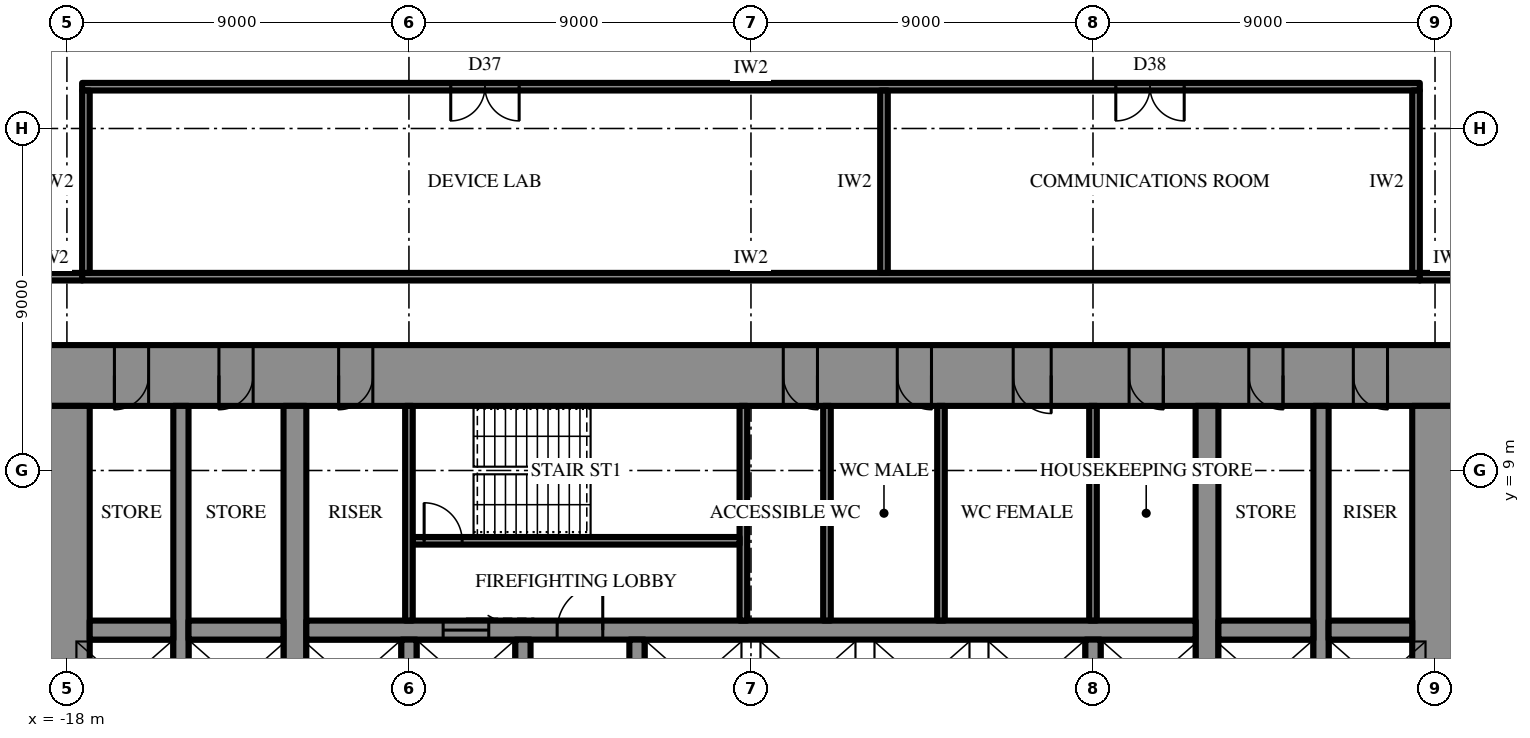
"""IFC4 building model, lengths in metres.
Left out: names, types, materials, properties, quantities, classifications, styles, units other than length and angle.
Written with IfcOpenShell. Run it as: python <this file> out.ifc"""

import sys

from ifc_helpers import new_model, si_unit, direction, frame, frame_2d, origin, place, context, subcontext, project, spatial, rectangle, extrude, element, fill, save


model = new_model("IFC4")
c1 = context("Model", 3, precision=1e-05, world=origin(), true_north=direction((0.0, 1.0)))
c2 = subcontext(c1, "Body", "Model", "MODEL_VIEW")
j1 = project(units=[si_unit("LENGTHUNIT", "METRE"), si_unit("PLANEANGLEUNIT", "RADIAN")], contexts=[c1])
p1 = place(None, origin())
s1 = spatial("IfcSite", under=j1, at=p1, CompositionType="ELEMENT")
p2 = place(p1, origin())
s2 = spatial("IfcBuilding", under=s1, at=p2, CompositionType="ELEMENT")
p3 = place(p2, frame((0.0, 0.0, 44.5)))
s3 = spatial("IfcBuildingStorey", under=s2, at=p3, CompositionType="ELEMENT", Elevation=44.5)
p4 = place(p3, frame((-18.6, 11.5, 0.0), z_axis=(0.0, 0.0, 1.0), x_axis=(1.0, 0.0, 0.0)))
e1 = element("IfcWall", 1, at=p4, inside=s3, PredefinedType="SHEAR", context=c2, shape_type="SweptSolid", body=[
    extrude(rectangle(XDim=37.2, YDim=1.6, at=frame_2d((18.6, 0.0))), origin(), (0.0, 0.0, 1.0), 4.2),
])
p5 = place(p4, frame((19.45, 0.0, 0.0)))
e2 = element("IfcOpeningElement", 2, at=p5, cuts=e1, PredefinedType="OPENING", context=c2, shape_type="SweptSolid", body=[
    extrude(rectangle(XDim=0.9, YDim=2.2, at=frame_2d((0.45, 1.1))), frame((0.0, 0.81, 0.0), z_axis=(0.0, -1.0, 0.0), x_axis=(1.0, 0.0, 0.0)), (0.0, 0.0, 1.0), 1.62),
])
p6 = place(p4, frame((22.45, 0.0, 0.0)))
e3 = element("IfcOpeningElement", 3, at=p6, cuts=e1, PredefinedType="OPENING", context=c2, shape_type="SweptSolid", body=[
    extrude(rectangle(XDim=0.9, YDim=2.2, at=frame_2d((0.45, 1.1))), frame((0.0, 0.81, 0.0), z_axis=(0.0, -1.0, 0.0), x_axis=(1.0, 0.0, 0.0)), (0.0, 0.0, 1.0), 1.62),
])
p7 = place(p4, frame((25.5, 0.0, 0.0)))
e4 = element("IfcOpeningElement", 4, at=p7, cuts=e1, PredefinedType="OPENING", context=c2, shape_type="SweptSolid", body=[
    extrude(rectangle(XDim=1.0, YDim=2.2, at=frame_2d((0.5, 1.1))), frame((0.0, 0.81, 0.0), z_axis=(0.0, -1.0, 0.0), x_axis=(1.0, 0.0, 0.0)), (0.0, 0.0, 1.0), 1.62),
])
p8 = place(p4, frame((1.85, 0.0, 0.0)))
e5 = element("IfcOpeningElement", 5, at=p8, cuts=e1, PredefinedType="OPENING", context=c2, shape_type="SweptSolid", body=[
    extrude(rectangle(XDim=0.9, YDim=2.2, at=frame_2d((0.45, 1.1))), frame((0.0, 0.81, 0.0), z_axis=(0.0, -1.0, 0.0), x_axis=(1.0, 0.0, 0.0)), (0.0, 0.0, 1.0), 1.62),
])
p9 = place(p4, frame((4.6, 0.0, 0.0)))
e6 = element("IfcOpeningElement", 6, at=p9, cuts=e1, PredefinedType="OPENING", context=c2, shape_type="SweptSolid", body=[
    extrude(rectangle(XDim=0.9, YDim=2.2, at=frame_2d((0.45, 1.1))), frame((0.0, 0.81, 0.0), z_axis=(0.0, -1.0, 0.0), x_axis=(1.0, 0.0, 0.0)), (0.0, 0.0, 1.0), 1.62),
])
p10 = place(p4, frame((7.75, 0.0, 0.0)))
e7 = element("IfcOpeningElement", 7, at=p10, cuts=e1, PredefinedType="OPENING", context=c2, shape_type="SweptSolid", body=[
    extrude(rectangle(XDim=0.9, YDim=2.2, at=frame_2d((0.45, 1.1))), frame((0.0, 0.81, 0.0), z_axis=(0.0, -1.0, 0.0), x_axis=(1.0, 0.0, 0.0)), (0.0, 0.0, 1.0), 1.62),
])
p11 = place(p4, frame((28.55, 0.0, 0.0)))
e8 = element("IfcOpeningElement", 8, at=p11, cuts=e1, PredefinedType="OPENING", context=c2, shape_type="SweptSolid", body=[
    extrude(rectangle(XDim=0.9, YDim=2.2, at=frame_2d((0.45, 1.1))), frame((0.0, 0.81, 0.0), z_axis=(0.0, -1.0, 0.0), x_axis=(1.0, 0.0, 0.0)), (0.0, 0.0, 1.0), 1.62),
])
p12 = place(p4, frame((31.7, 0.0, 0.0)))
e9 = element("IfcOpeningElement", 9, at=p12, cuts=e1, PredefinedType="OPENING", context=c2, shape_type="SweptSolid", body=[
    extrude(rectangle(XDim=0.9, YDim=2.2, at=frame_2d((0.45, 1.1))), frame((0.0, 0.81, 0.0), z_axis=(0.0, -1.0, 0.0), x_axis=(1.0, 0.0, 0.0)), (0.0, 0.0, 1.0), 1.62),
])
p13 = place(p4, frame((34.45, 0.0, 0.0)))
e10 = element("IfcOpeningElement", 10, at=p13, cuts=e1, PredefinedType="OPENING", context=c2, shape_type="SweptSolid", body=[
    extrude(rectangle(XDim=0.9, YDim=2.2, at=frame_2d((0.45, 1.1))), frame((0.0, 0.81, 0.0), z_axis=(0.0, -1.0, 0.0), x_axis=(1.0, 0.0, 0.0)), (0.0, 0.0, 1.0), 1.62),
])
p14 = place(p3, frame((18.0, -10.7, 0.0), z_axis=(0.0, 0.0, 1.0), x_axis=(0.0, 1.0, 0.0)))
e11 = element("IfcWall", 11, at=p14, inside=s3, PredefinedType="SHEAR", context=c2, shape_type="SweptSolid", body=[
    extrude(rectangle(XDim=21.4, YDim=1.2, at=frame_2d((10.7, 0.0))), origin(), (0.0, 0.0, 1.0), 4.2),
])
p15 = place(p14, frame((9.8, 0.0, 0.0)))
e12 = element("IfcOpeningElement", 12, at=p15, cuts=e11, PredefinedType="OPENING", context=c2, shape_type="SweptSolid", body=[
    extrude(rectangle(XDim=1.8, YDim=2.4, at=frame_2d((0.9, 1.2))), frame((0.0, 0.61, 0.0), z_axis=(0.0, -1.0, 0.0), x_axis=(1.0, 0.0, 0.0)), (0.0, 0.0, 1.0), 1.22),
])
p16 = place(p3, frame((-18.0, 10.7, 0.0), z_axis=(0.0, 0.0, 1.0), x_axis=(0.0, -1.0, 0.0)))
e13 = element("IfcWall", 13, at=p16, inside=s3, PredefinedType="SHEAR", context=c2, shape_type="SweptSolid", body=[
    extrude(rectangle(XDim=21.4, YDim=1.2, at=frame_2d((10.7, 0.0))), origin(), (0.0, 0.0, 1.0), 4.2),
])
p17 = place(p16, frame((9.8, 0.0, 0.0)))
e14 = element("IfcOpeningElement", 14, at=p17, cuts=e13, PredefinedType="OPENING", context=c2, shape_type="SweptSolid", body=[
    extrude(rectangle(XDim=1.8, YDim=2.4, at=frame_2d((0.9, 1.2))), frame((0.0, 0.61, 0.0), z_axis=(0.0, -1.0, 0.0), x_axis=(1.0, 0.0, 0.0)), (0.0, 0.0, 1.0), 1.22),
])
p18 = place(p3, frame((12.0, -10.7, 0.0), z_axis=(0.0, 0.0, 1.0), x_axis=(0.0, 1.0, 0.0)))
e15 = element("IfcWall", 15, at=p18, inside=s3, PredefinedType="SHEAR", context=c2, shape_type="SweptSolid", body=[
    extrude(rectangle(XDim=21.4, YDim=0.6, at=frame_2d((10.7, 0.0))), origin(), (0.0, 0.0, 1.0), 4.2),
])
p19 = place(p18, frame((9.8, 0.0, 0.0)))
e16 = element("IfcOpeningElement", 16, at=p19, cuts=e15, PredefinedType="OPENING", context=c2, shape_type="SweptSolid", body=[
    extrude(rectangle(XDim=1.8, YDim=2.4, at=frame_2d((0.9, 1.2))), frame((0.0, 0.31, 0.0), z_axis=(0.0, -1.0, 0.0), x_axis=(1.0, 0.0, 0.0)), (0.0, 0.0, 1.0), 0.62),
])
p20 = place(p3, frame((-12.0, -10.7, 0.0), z_axis=(0.0, 0.0, 1.0), x_axis=(0.0, 1.0, 0.0)))
e17 = element("IfcWall", 17, at=p20, inside=s3, PredefinedType="SHEAR", context=c2, shape_type="SweptSolid", body=[
    extrude(rectangle(XDim=21.4, YDim=0.6, at=frame_2d((10.7, 0.0))), origin(), (0.0, 0.0, 1.0), 4.2),
])
p21 = place(p20, frame((9.8, 0.0, 0.0)))
e18 = element("IfcOpeningElement", 18, at=p21, cuts=e17, PredefinedType="OPENING", context=c2, shape_type="SweptSolid", body=[
    extrude(rectangle(XDim=1.8, YDim=2.4, at=frame_2d((0.9, 1.2))), frame((0.0, 0.31, 0.0), z_axis=(0.0, -1.0, 0.0), x_axis=(1.0, 0.0, 0.0)), (0.0, 0.0, 1.0), 0.62),
])
p22 = place(p3, frame((15.0, -10.7, 0.0), z_axis=(0.0, 0.0, 1.0), x_axis=(0.0, 1.0, 0.0)))
e19 = element("IfcWall", 19, at=p22, inside=s3, PredefinedType="SHEAR", context=c2, shape_type="SweptSolid", body=[
    extrude(rectangle(XDim=21.4, YDim=0.4, at=frame_2d((10.7, 0.0))), origin(), (0.0, 0.0, 1.0), 4.2),
])
p23 = place(p22, frame((9.8, 0.0, 0.0)))
e20 = element("IfcOpeningElement", 20, at=p23, cuts=e19, PredefinedType="OPENING", context=c2, shape_type="SweptSolid", body=[
    extrude(rectangle(XDim=1.8, YDim=2.4, at=frame_2d((0.9, 1.2))), frame((0.0, 0.21, 0.0), z_axis=(0.0, -1.0, 0.0), x_axis=(1.0, 0.0, 0.0)), (0.0, 0.0, 1.0), 0.42),
])
p24 = place(p3, frame((-15.0, -10.7, 0.0), z_axis=(0.0, 0.0, 1.0), x_axis=(0.0, 1.0, 0.0)))
e21 = element("IfcWall", 21, at=p24, inside=s3, PredefinedType="SHEAR", context=c2, shape_type="SweptSolid", body=[
    extrude(rectangle(XDim=21.4, YDim=0.4, at=frame_2d((10.7, 0.0))), origin(), (0.0, 0.0, 1.0), 4.2),
])
p25 = place(p24, frame((9.8, 0.0, 0.0)))
e22 = element("IfcOpeningElement", 22, at=p25, cuts=e21, PredefinedType="OPENING", context=c2, shape_type="SweptSolid", body=[
    extrude(rectangle(XDim=1.8, YDim=2.4, at=frame_2d((0.9, 1.2))), frame((0.0, 0.21, 0.0), z_axis=(0.0, -1.0, 0.0), x_axis=(1.0, 0.0, 0.0)), (0.0, 0.0, 1.0), 0.42),
])
p26 = place(p3, frame((-17.4, 4.8, 0.0), z_axis=(0.0, 0.0, 1.0), x_axis=(1.0, 0.0, 0.0)))
e23 = element("IfcWall", 23, at=p26, inside=s3, PredefinedType="SHEAR", context=c2, shape_type="SweptSolid", body=[
    extrude(rectangle(XDim=2.2, YDim=0.5, at=frame_2d((1.1, 0.0))), origin(), (0.0, 0.0, 1.0), 4.2),
])
p27 = place(p3, frame((-14.8, 4.8, 0.0), z_axis=(0.0, 0.0, 1.0), x_axis=(1.0, 0.0, 0.0)))
e24 = element("IfcWall", 24, at=p27, inside=s3, PredefinedType="SHEAR", context=c2, shape_type="SweptSolid", body=[
    extrude(rectangle(XDim=2.5, YDim=0.5, at=frame_2d((1.25, 0.0))), origin(), (0.0, 0.0, 1.0), 4.2),
])
p28 = place(p3, frame((-11.7, 4.8, 0.0), z_axis=(0.0, 0.0, 1.0), x_axis=(1.0, 0.0, 0.0)))
e25 = element("IfcWall", 25, at=p28, inside=s3, PredefinedType="SHEAR", context=c2, shape_type="SweptSolid", body=[
    extrude(rectangle(XDim=23.4, YDim=0.5, at=frame_2d((11.7, 0.0))), origin(), (0.0, 0.0, 1.0), 4.2),
])
p29 = place(p28, frame((6.6, 0.0, 0.0)))
e26 = element("IfcOpeningElement", 26, at=p29, cuts=e25, PredefinedType="OPENING", context=c2, shape_type="SweptSolid", body=[
    extrude(rectangle(XDim=1.2, YDim=2.2, at=frame_2d((0.6, 1.1))), frame((0.0, 0.26, 0.0), z_axis=(0.0, -1.0, 0.0), x_axis=(1.0, 0.0, 0.0)), (0.0, 0.0, 1.0), 0.52),
])
p30 = place(p28, frame((3.6, 0.0, 0.0)))
e27 = element("IfcOpeningElement", 27, at=p30, cuts=e25, PredefinedType="OPENING", context=c2, shape_type="SweptSolid", body=[
    extrude(rectangle(XDim=1.2, YDim=2.2, at=frame_2d((0.6, 1.1))), frame((0.0, 0.26, 0.0), z_axis=(0.0, -1.0, 0.0), x_axis=(1.0, 0.0, 0.0)), (0.0, 0.0, 1.0), 0.52),
])
p31 = place(p3, frame((12.3, 4.8, 0.0), z_axis=(0.0, 0.0, 1.0), x_axis=(1.0, 0.0, 0.0)))
e28 = element("IfcWall", 28, at=p31, inside=s3, PredefinedType="SHEAR", context=c2, shape_type="SweptSolid", body=[
    extrude(rectangle(XDim=2.5, YDim=0.5, at=frame_2d((1.25, 0.0))), origin(), (0.0, 0.0, 1.0), 4.2),
])
p32 = place(p3, frame((15.2, 4.8, 0.0), z_axis=(0.0, 0.0, 1.0), x_axis=(1.0, 0.0, 0.0)))
e29 = element("IfcWall", 29, at=p32, inside=s3, PredefinedType="SHEAR", context=c2, shape_type="SweptSolid", body=[
    extrude(rectangle(XDim=2.2, YDim=0.5, at=frame_2d((1.1, 0.0))), origin(), (0.0, 0.0, 1.0), 4.2),
])
for number, where, z_axis, x_axis in (
    (30, (-9.0, 2.25, 0.0), (0.0, 0.0, 1.0), (0.0, 1.0, 0.0)),
    (31, (-6.0, 2.25, 0.0), (0.0, 0.0, 1.0), (0.0, 1.0, 0.0)),
    (32, (-3.0, 2.25, 0.0), (0.0, 0.0, 1.0), (0.0, 1.0, 0.0)),
    (33, (9.0, 2.25, 0.0), (0.0, 0.0, 1.0), (0.0, 1.0, 0.0)),
):
    element("IfcWall", number, at=place(p3, frame(where, z_axis=z_axis, x_axis=x_axis)), inside=s3, PredefinedType="SHEAR", context=c2, shape_type="SweptSolid", body=[
        extrude(rectangle(XDim=2.3, YDim=0.4, at=frame_2d((1.15, 0.0))), origin(), (0.0, 0.0, 1.0), 4.2),
    ])
p33 = place(p3, frame((-0.2, 5.05, 0.0), z_axis=(0.0, 0.0, 1.0), x_axis=(0.0, 1.0, 0.0)))
e34 = element("IfcWall", 34, at=p33, inside=s3, PredefinedType="SHEAR", context=c2, shape_type="SweptSolid", body=[
    extrude(rectangle(XDim=5.65, YDim=0.2, at=frame_2d((2.825, 0.0))), origin(), (0.0, 0.0, 1.0), 4.2),
])
p34 = place(p3, frame((-8.9, 7.15, 0.0), z_axis=(0.0, 0.0, 1.0), x_axis=(1.0, 0.0, 0.0)))
e35 = element("IfcWall", 35, at=p34, inside=s3, PredefinedType="SHEAR", context=c2, shape_type="SweptSolid", body=[
    extrude(rectangle(XDim=8.6, YDim=0.2, at=frame_2d((4.3, 0.0))), origin(), (0.0, 0.0, 1.0), 4.2),
])
p35 = place(p34, frame((0.3, 0.0, 0.0)))
e36 = element("IfcOpeningElement", 36, at=p35, cuts=e35, PredefinedType="OPENING", context=c2, shape_type="SweptSolid", body=[
    extrude(rectangle(XDim=1.0, YDim=2.2, at=frame_2d((0.5, 1.1))), frame((0.0, 0.11, 0.0), z_axis=(0.0, -1.0, 0.0), x_axis=(1.0, 0.0, 0.0)), (0.0, 0.0, 1.0), 0.22),
])
for number, where, z_axis, x_axis in (
    (37, (-9.0, 5.05, 0.0), (0.0, 0.0, 1.0), (0.0, 1.0, 0.0)),
    (38, (9.0, 5.05, 0.0), (0.0, 0.0, 1.0), (0.0, 1.0, 0.0)),
    (39, (2.0, 5.05, 0.0), (0.0, 0.0, 1.0), (0.0, 1.0, 0.0)),
    (40, (5.0, 5.05, 0.0), (0.0, 0.0, 1.0), (0.0, 1.0, 0.0)),
):
    element("IfcWall", number, at=place(p3, frame(where, z_axis=z_axis, x_axis=x_axis)), inside=s3, PredefinedType="PARTITIONING", context=c2, shape_type="SweptSolid", body=[
        extrude(rectangle(XDim=5.65, YDim=0.2, at=frame_2d((2.825, 0.0))), origin(), (0.0, 0.0, 1.0), 4.0),
    ])
p36 = place(p3, frame((-17.6, 14.1, 0.0), z_axis=(0.0, 0.0, 1.0), x_axis=(1.0, 0.0, 0.0)))
e41 = element("IfcWall", 41, at=p36, inside=s3, PredefinedType="PARTITIONING", context=c2, shape_type="SweptSolid", body=[
    extrude(rectangle(XDim=35.2, YDim=0.2, at=frame_2d((17.6, 0.0))), origin(), (0.0, 0.0, 1.0), 4.0),
])
p37 = place(p3, frame((-17.6, 19.1, 0.0), z_axis=(0.0, 0.0, 1.0), x_axis=(1.0, 0.0, 0.0)))
e42 = element("IfcWall", 42, at=p37, inside=s3, PredefinedType="PARTITIONING", context=c2, shape_type="SweptSolid", body=[
    extrude(rectangle(XDim=35.2, YDim=0.2, at=frame_2d((17.6, 0.0))), origin(), (0.0, 0.0, 1.0), 4.0),
])
p38 = place(p37, frame((9.7, 0.0, 0.0)))
e43 = element("IfcOpeningElement", 43, at=p38, cuts=e42, PredefinedType="OPENING", context=c2, shape_type="SweptSolid", body=[
    extrude(rectangle(XDim=1.8, YDim=2.4, at=frame_2d((0.9, 1.2))), frame((0.0, 0.11, 0.0), z_axis=(0.0, -1.0, 0.0), x_axis=(1.0, 0.0, 0.0)), (0.0, 0.0, 1.0), 0.22),
])
p39 = place(p37, frame((27.2, 0.0, 0.0)))
e44 = element("IfcOpeningElement", 44, at=p39, cuts=e42, PredefinedType="OPENING", context=c2, shape_type="SweptSolid", body=[
    extrude(rectangle(XDim=1.8, YDim=2.4, at=frame_2d((0.9, 1.2))), frame((0.0, 0.11, 0.0), z_axis=(0.0, -1.0, 0.0), x_axis=(1.0, 0.0, 0.0)), (0.0, 0.0, 1.0), 0.22),
])
for number, where, z_axis, x_axis in (
    (45, (-17.5, 14.2, 0.0), (0.0, 0.0, 1.0), (0.0, 1.0, 0.0)),
    (46, (3.5, 14.2, 0.0), (0.0, 0.0, 1.0), (0.0, 1.0, 0.0)),
    (47, (17.5, 14.2, 0.0), (0.0, 0.0, 1.0), (0.0, 1.0, 0.0)),
):
    element("IfcWall", number, at=place(p3, frame(where, z_axis=z_axis, x_axis=x_axis)), inside=s3, PredefinedType="PARTITIONING", context=c2, shape_type="SweptSolid", body=[
        extrude(rectangle(XDim=4.8, YDim=0.2, at=frame_2d((2.4, 0.0))), origin(), (0.0, 0.0, 1.0), 4.0),
    ])
for number, where, z_axis, x_axis in (
    (48, (-19.2, 14.1, 0.0), (0.0, 0.0, 1.0), (1.0, 0.0, 0.0)),
    (49, (17.6, 14.1, 0.0), (0.0, 0.0, 1.0), (1.0, 0.0, 0.0)),
):
    element("IfcWall", number, at=place(p3, frame(where, z_axis=z_axis, x_axis=x_axis)), inside=s3, PredefinedType="PARTITIONING", context=c2, shape_type="SweptSolid", body=[
        extrude(rectangle(XDim=1.6, YDim=0.2, at=frame_2d((0.8, 0.0))), origin(), (0.0, 0.0, 1.0), 4.0),
    ])
p40 = place(p29, origin())
e50 = element("IfcDoor", 50, at=p40, inside=s3, OperationType="SINGLE_SWING_LEFT", PredefinedType="DOOR", context=c2, shape_type="SweptSolid", body=[
    extrude(rectangle(XDim=1.2, YDim=2.2, at=frame_2d((0.6, 1.1))), frame((0.0, 0.025, 0.0), z_axis=(0.0, -1.0, 0.0), x_axis=(1.0, 0.0, 0.0)), (0.0, 0.0, 1.0), 0.05),
])
fill(e26, e50)
p41 = place(p35, origin())
e51 = element("IfcDoor", 51, at=p41, inside=s3, OperationType="SINGLE_SWING_RIGHT", PredefinedType="DOOR", context=c2, shape_type="SweptSolid", body=[
    extrude(rectangle(XDim=1.0, YDim=2.2, at=frame_2d((0.5, 1.1))), frame((0.0, 0.025, 0.0), z_axis=(0.0, -1.0, 0.0), x_axis=(1.0, 0.0, 0.0)), (0.0, 0.0, 1.0), 0.05),
])
fill(e36, e51)
p42 = place(p5, frame((0.9, 0.0, 0.0), z_axis=(0.0, 0.0, 1.0), x_axis=(-1.0, 0.0, 0.0)))
e52 = element("IfcDoor", 52, at=p42, inside=s3, OperationType="SINGLE_SWING_RIGHT", PredefinedType="DOOR", context=c2, shape_type="SweptSolid", body=[
    extrude(rectangle(XDim=0.9, YDim=2.2, at=frame_2d((0.45, 1.1))), frame((0.0, 0.025, 0.0), z_axis=(0.0, -1.0, 0.0), x_axis=(1.0, 0.0, 0.0)), (0.0, 0.0, 1.0), 0.05),
])
fill(e2, e52)
p43 = place(p6, frame((0.9, 0.0, 0.0), z_axis=(0.0, 0.0, 1.0), x_axis=(-1.0, 0.0, 0.0)))
e53 = element("IfcDoor", 53, at=p43, inside=s3, OperationType="SINGLE_SWING_RIGHT", PredefinedType="DOOR", context=c2, shape_type="SweptSolid", body=[
    extrude(rectangle(XDim=0.9, YDim=2.2, at=frame_2d((0.45, 1.1))), frame((0.0, 0.025, 0.0), z_axis=(0.0, -1.0, 0.0), x_axis=(1.0, 0.0, 0.0)), (0.0, 0.0, 1.0), 0.05),
])
fill(e3, e53)
p44 = place(p7, frame((1.0, 0.0, 0.0), z_axis=(0.0, 0.0, 1.0), x_axis=(-1.0, 0.0, 0.0)))
e54 = element("IfcDoor", 54, at=p44, inside=s3, OperationType="SINGLE_SWING_RIGHT", PredefinedType="DOOR", context=c2, shape_type="SweptSolid", body=[
    extrude(rectangle(XDim=1.0, YDim=2.2, at=frame_2d((0.5, 1.1))), frame((0.0, 0.025, 0.0), z_axis=(0.0, -1.0, 0.0), x_axis=(1.0, 0.0, 0.0)), (0.0, 0.0, 1.0), 0.05),
])
fill(e4, e54)
p45 = place(p8, frame((0.9, 0.0, 0.0), z_axis=(0.0, 0.0, 1.0), x_axis=(-1.0, 0.0, 0.0)))
e55 = element("IfcDoor", 55, at=p45, inside=s3, OperationType="SINGLE_SWING_LEFT", PredefinedType="DOOR", context=c2, shape_type="SweptSolid", body=[
    extrude(rectangle(XDim=0.9, YDim=2.2, at=frame_2d((0.45, 1.1))), frame((0.0, 0.025, 0.0), z_axis=(0.0, -1.0, 0.0), x_axis=(1.0, 0.0, 0.0)), (0.0, 0.0, 1.0), 0.05),
])
fill(e5, e55)
p46 = place(p9, frame((0.9, 0.0, 0.0), z_axis=(0.0, 0.0, 1.0), x_axis=(-1.0, 0.0, 0.0)))
e56 = element("IfcDoor", 56, at=p46, inside=s3, OperationType="SINGLE_SWING_LEFT", PredefinedType="DOOR", context=c2, shape_type="SweptSolid", body=[
    extrude(rectangle(XDim=0.9, YDim=2.2, at=frame_2d((0.45, 1.1))), frame((0.0, 0.025, 0.0), z_axis=(0.0, -1.0, 0.0), x_axis=(1.0, 0.0, 0.0)), (0.0, 0.0, 1.0), 0.05),
])
fill(e6, e56)
p47 = place(p10, frame((0.9, 0.0, 0.0), z_axis=(0.0, 0.0, 1.0), x_axis=(-1.0, 0.0, 0.0)))
e57 = element("IfcDoor", 57, at=p47, inside=s3, OperationType="SINGLE_SWING_LEFT", PredefinedType="DOOR", context=c2, shape_type="SweptSolid", body=[
    extrude(rectangle(XDim=0.9, YDim=2.2, at=frame_2d((0.45, 1.1))), frame((0.0, 0.025, 0.0), z_axis=(0.0, -1.0, 0.0), x_axis=(1.0, 0.0, 0.0)), (0.0, 0.0, 1.0), 0.05),
])
fill(e7, e57)
p48 = place(p11, frame((0.9, 0.0, 0.0), z_axis=(0.0, 0.0, 1.0), x_axis=(-1.0, 0.0, 0.0)))
e58 = element("IfcDoor", 58, at=p48, inside=s3, OperationType="SINGLE_SWING_RIGHT", PredefinedType="DOOR", context=c2, shape_type="SweptSolid", body=[
    extrude(rectangle(XDim=0.9, YDim=2.2, at=frame_2d((0.45, 1.1))), frame((0.0, 0.025, 0.0), z_axis=(0.0, -1.0, 0.0), x_axis=(1.0, 0.0, 0.0)), (0.0, 0.0, 1.0), 0.05),
])
fill(e8, e58)
p49 = place(p12, frame((0.9, 0.0, 0.0), z_axis=(0.0, 0.0, 1.0), x_axis=(-1.0, 0.0, 0.0)))
e59 = element("IfcDoor", 59, at=p49, inside=s3, OperationType="SINGLE_SWING_RIGHT", PredefinedType="DOOR", context=c2, shape_type="SweptSolid", body=[
    extrude(rectangle(XDim=0.9, YDim=2.2, at=frame_2d((0.45, 1.1))), frame((0.0, 0.025, 0.0), z_axis=(0.0, -1.0, 0.0), x_axis=(1.0, 0.0, 0.0)), (0.0, 0.0, 1.0), 0.05),
])
fill(e9, e59)
p50 = place(p13, frame((0.9, 0.0, 0.0), z_axis=(0.0, 0.0, 1.0), x_axis=(-1.0, 0.0, 0.0)))
e60 = element("IfcDoor", 60, at=p50, inside=s3, OperationType="SINGLE_SWING_RIGHT", PredefinedType="DOOR", context=c2, shape_type="SweptSolid", body=[
    extrude(rectangle(XDim=0.9, YDim=2.2, at=frame_2d((0.45, 1.1))), frame((0.0, 0.025, 0.0), z_axis=(0.0, -1.0, 0.0), x_axis=(1.0, 0.0, 0.0)), (0.0, 0.0, 1.0), 0.05),
])
fill(e10, e60)
p51 = place(p30, origin())
e61 = element("IfcDoor", 61, at=p51, inside=s3, OperationType="SLIDING_TO_LEFT", PredefinedType="DOOR", context=c2, shape_type="SweptSolid", body=[
    extrude(rectangle(XDim=1.2, YDim=2.2, at=frame_2d((0.6, 1.1))), frame((0.0, 0.025, 0.0), z_axis=(0.0, -1.0, 0.0), x_axis=(1.0, 0.0, 0.0)), (0.0, 0.0, 1.0), 0.05),
])
fill(e27, e61)
p52 = place(p38, frame((1.8, 0.0, 0.0), z_axis=(0.0, 0.0, 1.0), x_axis=(-1.0, 0.0, 0.0)))
e62 = element("IfcDoor", 62, at=p52, inside=s3, OperationType="DOUBLE_DOOR_SINGLE_SWING", PredefinedType="DOOR", context=c2, shape_type="SweptSolid", body=[
    extrude(rectangle(XDim=1.8, YDim=2.4, at=frame_2d((0.9, 1.2))), frame((0.0, 0.025, 0.0), z_axis=(0.0, -1.0, 0.0), x_axis=(1.0, 0.0, 0.0)), (0.0, 0.0, 1.0), 0.05),
])
fill(e43, e62)
p53 = place(p39, frame((1.8, 0.0, 0.0), z_axis=(0.0, 0.0, 1.0), x_axis=(-1.0, 0.0, 0.0)))
e63 = element("IfcDoor", 63, at=p53, inside=s3, OperationType="DOUBLE_DOOR_SINGLE_SWING", PredefinedType="DOOR", context=c2, shape_type="SweptSolid", body=[
    extrude(rectangle(XDim=1.8, YDim=2.4, at=frame_2d((0.9, 1.2))), frame((0.0, 0.025, 0.0), z_axis=(0.0, -1.0, 0.0), x_axis=(1.0, 0.0, 0.0)), (0.0, 0.0, 1.0), 0.05),
])
fill(e44, e63)
save(model, sys.argv[1])
